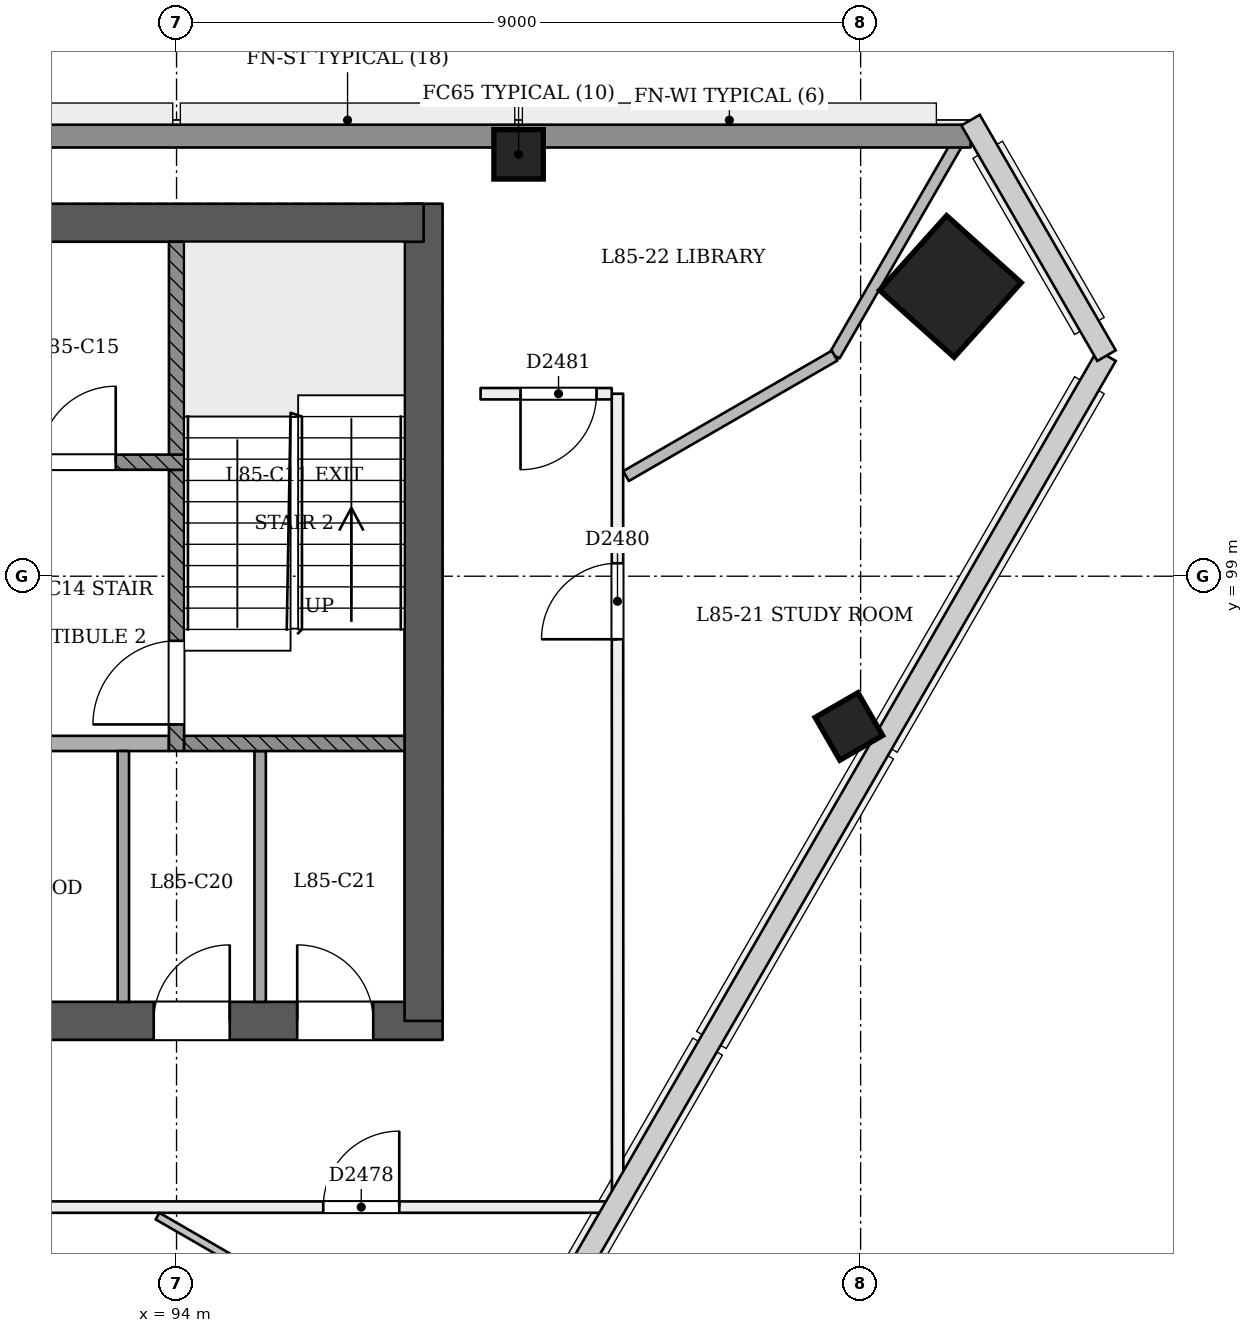
"""IFC4 building model, lengths in metres.
Left out: names, types, materials, properties, quantities, classifications, styles, units other than length and angle.
Written with IfcOpenShell. Run it as: python <this file> out.ifc"""

import sys

from ifc_helpers import new_model, si_unit, direction, frame, frame_2d, origin, origin_2d, place, context, subcontext, project, spatial, rectangle, extrude, element, fill, save


model = new_model("IFC4")
c1 = context("Model", 3, precision=1e-05, world=origin(), true_north=direction((0.0, 1.0)))
c2 = subcontext(c1, "Body", "Model", "MODEL_VIEW")
j1 = project(units=[si_unit("LENGTHUNIT", "METRE"), si_unit("PLANEANGLEUNIT", "RADIAN")], contexts=[c1])
p1 = place(None, origin())
s1 = spatial("IfcSite", under=j1, at=p1, CompositionType="ELEMENT")
p2 = place(p1, origin())
s2 = spatial("IfcBuilding", under=s1, at=p2, CompositionType="ELEMENT")
p3 = place(p2, frame((0.0, 0.0, 327.4)))
s3 = spatial("IfcBuildingStorey", under=s2, at=p3, CompositionType="ELEMENT", Elevation=327.4)
p4 = place(p3, frame((72.75, 93.15, 0.0), z_axis=(0.0, 0.0, 1.0), x_axis=(1.0, 0.0, 0.0)))
e1 = element("IfcWall", 1, at=p4, inside=s3, PredefinedType="SHEAR", context=c2, shape_type="SweptSolid", body=[
    extrude(rectangle(XDim=24.75, YDim=0.5, at=frame_2d((12.375, 0.0))), origin(), (0.0, 0.0, 1.0), 3.6),
])
p5 = place(p4, frame((1.05, 0.0, 0.0)))
e2 = element("IfcOpeningElement", 2, at=p5, cuts=e1, PredefinedType="OPENING", context=c2, shape_type="SweptSolid", body=[
    extrude(rectangle(XDim=1.2, YDim=2.1, at=frame_2d((0.6, 1.05))), frame((0.0, 0.26, 0.0), z_axis=(0.0, -1.0, 0.0), x_axis=(1.0, 0.0, 0.0)), (0.0, 0.0, 1.0), 0.521),
])
p6 = place(p4, frame((3.25, 0.0, 0.0)))
e3 = element("IfcOpeningElement", 3, at=p6, cuts=e1, PredefinedType="OPENING", context=c2, shape_type="SweptSolid", body=[
    extrude(rectangle(XDim=1.2, YDim=2.1, at=frame_2d((0.6, 1.05))), frame((0.0, 0.26, 0.0), z_axis=(0.0, -1.0, 0.0), x_axis=(1.0, 0.0, 0.0)), (0.0, 0.0, 1.0), 0.521),
])
p7 = place(p4, frame((13.25, 0.0, 0.0)))
e4 = element("IfcOpeningElement", 4, at=p7, cuts=e1, PredefinedType="OPENING", context=c2, shape_type="SweptSolid", body=[
    extrude(rectangle(XDim=1.2, YDim=2.1, at=frame_2d((0.6, 1.05))), frame((0.0, 0.26, 0.0), z_axis=(0.0, -1.0, 0.0), x_axis=(1.0, 0.0, 0.0)), (0.0, 0.0, 1.0), 0.521),
])
p8 = place(p4, frame((15.212, 0.0, 0.0)))
e5 = element("IfcOpeningElement", 5, at=p8, cuts=e1, PredefinedType="OPENING", context=c2, shape_type="SweptSolid", body=[
    extrude(rectangle(XDim=1.0, YDim=2.1, at=frame_2d((0.5, 1.05))), frame((0.0, 0.26, 0.0), z_axis=(0.0, -1.0, 0.0), x_axis=(1.0, 0.0, 0.0)), (0.0, 0.0, 1.0), 0.521),
])
p9 = place(p4, frame((18.05, 0.0, 0.0)))
e6 = element("IfcOpeningElement", 6, at=p9, cuts=e1, PredefinedType="OPENING", context=c2, shape_type="SweptSolid", body=[
    extrude(rectangle(XDim=1.0, YDim=2.1, at=frame_2d((0.5, 1.05))), frame((0.0, 0.26, 0.0), z_axis=(0.0, -1.0, 0.0), x_axis=(1.0, 0.0, 0.0)), (0.0, 0.0, 1.0), 0.521),
])
p10 = place(p4, frame((20.95, 0.0, 0.0)))
e7 = element("IfcOpeningElement", 7, at=p10, cuts=e1, PredefinedType="OPENING", context=c2, shape_type="SweptSolid", body=[
    extrude(rectangle(XDim=1.0, YDim=2.1, at=frame_2d((0.5, 1.05))), frame((0.0, 0.26, 0.0), z_axis=(0.0, -1.0, 0.0), x_axis=(1.0, 0.0, 0.0)), (0.0, 0.0, 1.0), 0.521),
])
p11 = place(p4, frame((22.837, 0.0, 0.0)))
e8 = element("IfcOpeningElement", 8, at=p11, cuts=e1, PredefinedType="OPENING", context=c2, shape_type="SweptSolid", body=[
    extrude(rectangle(XDim=1.0, YDim=2.1, at=frame_2d((0.5, 1.05))), frame((0.0, 0.26, 0.0), z_axis=(0.0, -1.0, 0.0), x_axis=(1.0, 0.0, 0.0)), (0.0, 0.0, 1.0), 0.521),
])
p12 = place(p3, frame((97.25, 93.15, 0.0), z_axis=(0.0, 0.0, 1.0), x_axis=(0.0, 1.0, 0.0)))
e9 = element("IfcWall", 9, at=p12, inside=s3, PredefinedType="SHEAR", context=c2, shape_type="SweptSolid", body=[
    extrude(rectangle(XDim=10.75, YDim=0.5, at=frame_2d((5.375, 0.0))), origin(), (0.0, 0.0, 1.0), 3.6),
])
p13 = place(p3, frame((97.25, 103.65, 0.0), z_axis=(0.0, 0.0, 1.0), x_axis=(-1.0, 0.0, 0.0)))
e10 = element("IfcWall", 10, at=p13, inside=s3, PredefinedType="SHEAR", context=c2, shape_type="SweptSolid", body=[
    extrude(rectangle(XDim=24.75, YDim=0.5, at=frame_2d((12.375, 0.0))), origin(), (0.0, 0.0, 1.0), 3.6),
])
p14 = place(p3, frame((104.215, 102.801, 0.0), z_axis=(-0.028401814599, 0.009218727412, 0.999554076572), x_axis=(0.500757440285, -0.865302682537, 0.02220931319)))
e11 = element("IfcColumn", 11, at=p14, inside=s3, PredefinedType="COLUMN", context=c2, shape_type="SweptSolid", body=[
    extrude(rectangle(XDim=1.32, YDim=1.32, at=origin_2d()), origin(), (0.0, 0.0, 1.0), 3.602),
])
p15 = place(p3, frame((98.5, 104.55, 0.0), z_axis=(0.0, 0.0, 1.0), x_axis=(1.0, 0.0, 0.0)))
e12 = element("IfcColumn", 12, at=p15, inside=s3, PredefinedType="COLUMN", context=c2, shape_type="SweptSolid", body=[
    extrude(rectangle(XDim=0.65, YDim=0.65, at=origin_2d()), origin(), (0.0, 0.0, 1.0), 3.6),
])
p16 = place(p3, frame((102.873, 96.977, -0.02), z_axis=(-0.022222910879, 0.038415824599, 0.999014697916), x_axis=(-0.49950564351, -0.866026381385, 0.022190512525)))
e13 = element("IfcColumn", 13, at=p16, inside=s3, PredefinedType="COLUMN", context=c2, shape_type="SweptSolid", body=[
    extrude(rectangle(XDim=0.65, YDim=0.65, at=origin_2d()), origin(), (0.0, 0.0, 1.0), 3.604),
])
p17 = place(p3, frame((92.262, 90.7, 0.0), z_axis=(0.0, 0.0, 1.0), x_axis=(1.0, 0.0, 0.0)))
e14 = element("IfcWall", 14, at=p17, inside=s3, PredefinedType="PARTITIONING", context=c2, shape_type="SweptSolid", body=[
    extrude(rectangle(XDim=7.419, YDim=0.15, at=frame_2d((3.71, 0.0))), origin(), (0.0, 0.0, 1.0), 2.7),
])
p18 = place(p17, frame((3.668, 0.0, 0.0)))
e15 = element("IfcOpeningElement", 15, at=p18, cuts=e14, PredefinedType="OPENING", context=c2, shape_type="SweptSolid", body=[
    extrude(rectangle(XDim=1.0, YDim=2.1, at=frame_2d((0.5, 1.05))), frame((0.0, 0.085, 0.0), z_axis=(0.0, -1.0, 0.0), x_axis=(1.0, 0.0, 0.0)), (0.0, 0.0, 1.0), 0.171),
])
p19 = place(p3, frame((99.803, 90.881, 0.0), z_axis=(0.0, 0.0, 1.0), x_axis=(-0.000232083172, 0.999999973069, 0.0)))
e16 = element("IfcWall", 16, at=p19, inside=s3, PredefinedType="PARTITIONING", context=c2, shape_type="SweptSolid", body=[
    extrude(rectangle(XDim=10.52, YDim=0.15, at=frame_2d((5.26, 0.0))), origin(), (0.0, 0.0, 1.0), 2.7),
])
p20 = place(p19, frame((7.289, 0.0, 0.0)))
e17 = element("IfcOpeningElement", 17, at=p20, cuts=e16, PredefinedType="OPENING", context=c2, shape_type="SweptSolid", body=[
    extrude(rectangle(XDim=1.0, YDim=2.1, at=frame_2d((0.5, 1.05))), frame((0.0, 0.085, 0.0), z_axis=(0.0, -1.0, 0.0), x_axis=(1.0, 0.0, 0.0)), (0.0, 0.0, 1.0), 0.171),
])
p21 = place(p3, frame((99.726, 101.401, 0.0), z_axis=(0.0, 0.0, 1.0), x_axis=(-1.0, 0.0, 0.0)))
e18 = element("IfcWall", 18, at=p21, inside=s3, PredefinedType="PARTITIONING", context=c2, shape_type="SweptSolid", body=[
    extrude(rectangle(XDim=1.726, YDim=0.15, at=frame_2d((0.863, 0.0))), origin(), (0.0, 0.0, 1.0), 3.2),
])
p22 = place(p21, frame((0.2, 0.0, 0.0)))
e19 = element("IfcOpeningElement", 19, at=p22, cuts=e18, PredefinedType="OPENING", context=c2, shape_type="SweptSolid", body=[
    extrude(rectangle(XDim=1.0, YDim=2.1, at=frame_2d((0.5, 1.05))), frame((0.0, 0.085, 0.0), z_axis=(0.0, -1.0, 0.0), x_axis=(1.0, 0.0, 0.0)), (0.0, 0.0, 1.0), 0.171),
])
p23 = place(p3, frame((93.75, 90.582, 0.0), z_axis=(0.0, 0.0, 1.0), x_axis=(0.865988405058, -0.500064078198, 0.0)))
e20 = element("IfcWall", 20, at=p23, inside=s3, PredefinedType="PARTITIONING", context=c2, shape_type="SweptSolid", body=[
    extrude(rectangle(XDim=1.753, YDim=0.1, at=frame_2d((0.876, 0.0))), origin(), (0.0, 0.0, 1.0), 3.2),
])
p24 = place(p3, frame((104.389, 104.9, 0.0), z_axis=(0.0, 0.0, 1.0), x_axis=(-0.50003787499, -0.866003535544, 0.0)))
e21 = element("IfcWall", 21, at=p24, inside=s3, PredefinedType="PARTITIONING", context=c2, shape_type="SweptSolid", body=[
    extrude(rectangle(XDim=3.462, YDim=0.15, at=frame_2d((1.731, 0.0))), origin(), (0.0, 0.0, 1.0), 2.7),
])
p25 = place(p3, frame((102.658, 101.902, 0.0), z_axis=(0.0, 0.0, 1.0), x_axis=(-0.865991855495, -0.50005810284, 0.0)))
e22 = element("IfcWall", 22, at=p25, inside=s3, PredefinedType="PARTITIONING", context=c2, shape_type="SweptSolid", body=[
    extrude(rectangle(XDim=3.169, YDim=0.15, at=frame_2d((1.584, 0.0))), origin(), (0.0, 0.0, 1.0), 3.2),
])
p26 = place(p3, frame((65.554, 104.79, 0.0), z_axis=(0.0, 0.0, 1.0), x_axis=(1.0, 0.0, 0.0)))
e23 = element("IfcWall", 23, at=p26, inside=s3, PredefinedType="SOLIDWALL", context=c2, shape_type="SweptSolid", body=[
    extrude(rectangle(XDim=38.893, YDim=0.3, at=frame_2d((19.446, 0.0))), origin(), (0.0, 0.0, 1.0), 2.7),
])
for number, where, z_axis, x_axis in (
    (24, (93.3, 93.4, 0.0), (0.0, 0.0, 1.0), (0.0, 1.0, 0.0)),
    (25, (95.1, 93.4, 0.0), (0.0, 0.0, 1.0), (0.0, 1.0, 0.0)),
):
    element("IfcWall", number, at=place(p3, frame(where, z_axis=z_axis, x_axis=x_axis)), inside=s3, PredefinedType="PARTITIONING", context=c2, shape_type="SweptSolid", body=[
        extrude(rectangle(XDim=3.3, YDim=0.15, at=frame_2d((1.65, 0.0))), origin(), (0.0, 0.0, 1.0), 3.2),
    ])
p27 = place(p3, frame((91.5, 96.8, 0.0), z_axis=(0.0, 0.0, 1.0), x_axis=(1.0, 0.0, 0.0)))
e26 = element("IfcWall", 26, at=p27, inside=s3, PredefinedType="PARTITIONING", context=c2, shape_type="SweptSolid", body=[
    extrude(rectangle(XDim=2.4, YDim=0.2, at=frame_2d((1.2, 0.0))), origin(), (0.0, 0.0, 1.0), 3.2),
])
p28 = place(p3, frame((94.0, 96.7, 0.0), z_axis=(0.0, 0.0, 1.0), x_axis=(0.0, 1.0, 0.0)))
e27 = element("IfcWall", 27, at=p28, inside=s3, PredefinedType="SOLIDWALL", context=c2, shape_type="SweptSolid", body=[
    extrude(rectangle(XDim=3.7, YDim=0.2, at=frame_2d((1.85, 0.0))), origin(), (0.0, 0.0, 1.0), 3.2),
])
p29 = place(p28, frame((0.35, 0.0, 0.0)))
e28 = element("IfcOpeningElement", 28, at=p29, cuts=e27, PredefinedType="OPENING", context=c2, shape_type="SweptSolid", body=[
    extrude(rectangle(XDim=1.1, YDim=2.1, at=frame_2d((0.55, 1.05))), frame((0.0, 0.11, 0.0), z_axis=(0.0, -1.0, 0.0), x_axis=(1.0, 0.0, 0.0)), (0.0, 0.0, 1.0), 0.221),
])
p30 = place(p3, frame((94.1, 96.8, 0.0), z_axis=(0.0, 0.0, 1.0), x_axis=(1.0, 0.0, 0.0)))
e29 = element("IfcWall", 29, at=p30, inside=s3, PredefinedType="SOLIDWALL", context=c2, shape_type="SweptSolid", body=[
    extrude(rectangle(XDim=2.9, YDim=0.2, at=frame_2d((1.45, 0.0))), origin(), (0.0, 0.0, 1.0), 3.2),
])
p31 = place(p3, frame((75.9, 100.5, 0.0), z_axis=(0.0, 0.0, 1.0), x_axis=(1.0, 0.0, 0.0)))
e30 = element("IfcWall", 30, at=p31, inside=s3, PredefinedType="SOLIDWALL", context=c2, shape_type="SweptSolid", body=[
    extrude(rectangle(XDim=18.2, YDim=0.2, at=frame_2d((9.1, 0.0))), origin(), (0.0, 0.0, 1.0), 3.2),
])
p32 = place(p31, frame((2.6, 0.0, 0.0)))
e31 = element("IfcOpeningElement", 31, at=p32, cuts=e30, PredefinedType="OPENING", context=c2, shape_type="SweptSolid", body=[
    extrude(rectangle(XDim=1.1, YDim=2.1, at=frame_2d((0.55, 1.05))), frame((0.0, 0.11, 0.0), z_axis=(0.0, -1.0, 0.0), x_axis=(1.0, 0.0, 0.0)), (0.0, 0.0, 1.0), 0.221),
])
p33 = place(p31, frame((4.5, 0.0, 0.0)))
e32 = element("IfcOpeningElement", 32, at=p33, cuts=e30, PredefinedType="OPENING", context=c2, shape_type="SweptSolid", body=[
    extrude(rectangle(XDim=1.1, YDim=2.1, at=frame_2d((0.55, 1.05))), frame((0.0, 0.11, 0.0), z_axis=(0.0, -1.0, 0.0), x_axis=(1.0, 0.0, 0.0)), (0.0, 0.0, 1.0), 0.221),
])
p34 = place(p31, frame((6.4, 0.0, 0.0)))
e33 = element("IfcOpeningElement", 33, at=p34, cuts=e30, PredefinedType="OPENING", context=c2, shape_type="SweptSolid", body=[
    extrude(rectangle(XDim=1.1, YDim=2.1, at=frame_2d((0.55, 1.05))), frame((0.0, 0.11, 0.0), z_axis=(0.0, -1.0, 0.0), x_axis=(1.0, 0.0, 0.0)), (0.0, 0.0, 1.0), 0.221),
])
p35 = place(p31, frame((8.3, 0.0, 0.0)))
e34 = element("IfcOpeningElement", 34, at=p35, cuts=e30, PredefinedType="OPENING", context=c2, shape_type="SweptSolid", body=[
    extrude(rectangle(XDim=1.1, YDim=2.1, at=frame_2d((0.55, 1.05))), frame((0.0, 0.11, 0.0), z_axis=(0.0, -1.0, 0.0), x_axis=(1.0, 0.0, 0.0)), (0.0, 0.0, 1.0), 0.221),
])
p36 = place(p31, frame((10.2, 0.0, 0.0)))
e35 = element("IfcOpeningElement", 35, at=p36, cuts=e30, PredefinedType="OPENING", context=c2, shape_type="SweptSolid", body=[
    extrude(rectangle(XDim=1.1, YDim=2.1, at=frame_2d((0.55, 1.05))), frame((0.0, 0.11, 0.0), z_axis=(0.0, -1.0, 0.0), x_axis=(1.0, 0.0, 0.0)), (0.0, 0.0, 1.0), 0.221),
])
p37 = place(p31, frame((12.1, 0.0, 0.0)))
e36 = element("IfcOpeningElement", 36, at=p37, cuts=e30, PredefinedType="OPENING", context=c2, shape_type="SweptSolid", body=[
    extrude(rectangle(XDim=1.1, YDim=2.1, at=frame_2d((0.55, 1.05))), frame((0.0, 0.11, 0.0), z_axis=(0.0, -1.0, 0.0), x_axis=(1.0, 0.0, 0.0)), (0.0, 0.0, 1.0), 0.221),
])
p38 = place(p31, frame((14.0, 0.0, 0.0)))
e37 = element("IfcOpeningElement", 37, at=p38, cuts=e30, PredefinedType="OPENING", context=c2, shape_type="SweptSolid", body=[
    extrude(rectangle(XDim=1.1, YDim=2.1, at=frame_2d((0.55, 1.05))), frame((0.0, 0.11, 0.0), z_axis=(0.0, -1.0, 0.0), x_axis=(1.0, 0.0, 0.0)), (0.0, 0.0, 1.0), 0.221),
])
p39 = place(p31, frame((0.65, 0.0, 0.0)))
e38 = element("IfcOpeningElement", 38, at=p39, cuts=e30, PredefinedType="OPENING", context=c2, shape_type="SweptSolid", body=[
    extrude(rectangle(XDim=1.0, YDim=2.1, at=frame_2d((0.5, 1.05))), frame((0.0, 0.11, 0.0), z_axis=(0.0, -1.0, 0.0), x_axis=(1.0, 0.0, 0.0)), (0.0, 0.0, 1.0), 0.221),
])
p40 = place(p31, frame((16.3, 0.0, 0.0)))
e39 = element("IfcOpeningElement", 39, at=p40, cuts=e30, PredefinedType="OPENING", context=c2, shape_type="SweptSolid", body=[
    extrude(rectangle(XDim=1.0, YDim=2.1, at=frame_2d((0.5, 1.05))), frame((0.0, 0.11, 0.0), z_axis=(0.0, -1.0, 0.0), x_axis=(1.0, 0.0, 0.0)), (0.0, 0.0, 1.0), 0.221),
])
p41 = place(p3, frame((94.0, 100.6, 0.0), z_axis=(0.0, 0.0, 1.0), x_axis=(0.0, 1.0, 0.0)))
e40 = element("IfcWall", 40, at=p41, inside=s3, PredefinedType="SOLIDWALL", context=c2, shape_type="SweptSolid", body=[
    extrude(rectangle(XDim=2.8, YDim=0.2, at=frame_2d((1.4, 0.0))), origin(), (0.0, 0.0, 1.0), 3.2),
])
p42 = place(p18, origin())
e41 = element("IfcDoor", 41, at=p42, inside=s3, OperationType="SINGLE_SWING_RIGHT", PredefinedType="NOTDEFINED", context=c2, shape_type="SweptSolid", body=[
    extrude(rectangle(XDim=1.0, YDim=2.1, at=frame_2d((0.5, 1.05))), frame((0.0, 0.025, 0.0), z_axis=(0.0, -1.0, 0.0), x_axis=(1.0, 0.0, 0.0)), (0.0, 0.0, 1.0), 0.05),
])
fill(e15, e41)
p43 = place(p20, origin())
e42 = element("IfcDoor", 42, at=p43, inside=s3, OperationType="SINGLE_SWING_LEFT", PredefinedType="NOTDEFINED", context=c2, shape_type="SweptSolid", body=[
    extrude(rectangle(XDim=1.0, YDim=2.1, at=frame_2d((0.5, 1.05))), frame((0.0, 0.025, 0.0), z_axis=(0.0, -1.0, 0.0), x_axis=(1.0, 0.0, 0.0)), (0.0, 0.0, 1.0), 0.05),
])
fill(e17, e42)
p44 = place(p22, origin())
e43 = element("IfcDoor", 43, at=p44, inside=s3, OperationType="SINGLE_SWING_RIGHT", PredefinedType="NOTDEFINED", context=c2, shape_type="SweptSolid", body=[
    extrude(rectangle(XDim=1.0, YDim=2.1, at=frame_2d((0.5, 1.05))), frame((0.0, 0.025, 0.0), z_axis=(0.0, -1.0, 0.0), x_axis=(1.0, 0.0, 0.0)), (0.0, 0.0, 1.0), 0.05),
])
fill(e19, e43)
p45 = place(p29, origin())
e44 = element("IfcDoor", 44, at=p45, inside=s3, OperationType="SINGLE_SWING_LEFT", PredefinedType="NOTDEFINED", context=c2, shape_type="SweptSolid", body=[
    extrude(rectangle(XDim=1.1, YDim=2.1, at=frame_2d((0.55, 1.05))), frame((0.0, 0.025, 0.0), z_axis=(0.0, -1.0, 0.0), x_axis=(1.0, 0.0, 0.0)), (0.0, 0.0, 1.0), 0.05),
])
fill(e28, e44)
p46 = place(p40, origin())
e45 = element("IfcDoor", 45, at=p46, inside=s3, OperationType="SINGLE_SWING_RIGHT", PredefinedType="NOTDEFINED", context=c2, shape_type="SweptSolid", body=[
    extrude(rectangle(XDim=1.0, YDim=2.1, at=frame_2d((0.5, 1.05))), frame((0.0, 0.025, 0.0), z_axis=(0.0, -1.0, 0.0), x_axis=(1.0, 0.0, 0.0)), (0.0, 0.0, 1.0), 0.05),
])
fill(e39, e45)
p47 = place(p10, origin())
e46 = element("IfcDoor", 46, at=p47, inside=s3, OperationType="SINGLE_SWING_RIGHT", PredefinedType="NOTDEFINED", context=c2, shape_type="SweptSolid", body=[
    extrude(rectangle(XDim=1.0, YDim=2.1, at=frame_2d((0.5, 1.05))), frame((0.0, 0.025, 0.0), z_axis=(0.0, -1.0, 0.0), x_axis=(1.0, 0.0, 0.0)), (0.0, 0.0, 1.0), 0.05),
])
fill(e7, e46)
p48 = place(p11, origin())
e47 = element("IfcDoor", 47, at=p48, inside=s3, OperationType="SINGLE_SWING_LEFT", PredefinedType="NOTDEFINED", context=c2, shape_type="SweptSolid", body=[
    extrude(rectangle(XDim=1.0, YDim=2.1, at=frame_2d((0.5, 1.05))), frame((0.0, 0.025, 0.0), z_axis=(0.0, -1.0, 0.0), x_axis=(1.0, 0.0, 0.0)), (0.0, 0.0, 1.0), 0.05),
])
fill(e8, e47)
save(model, sys.argv[1])
